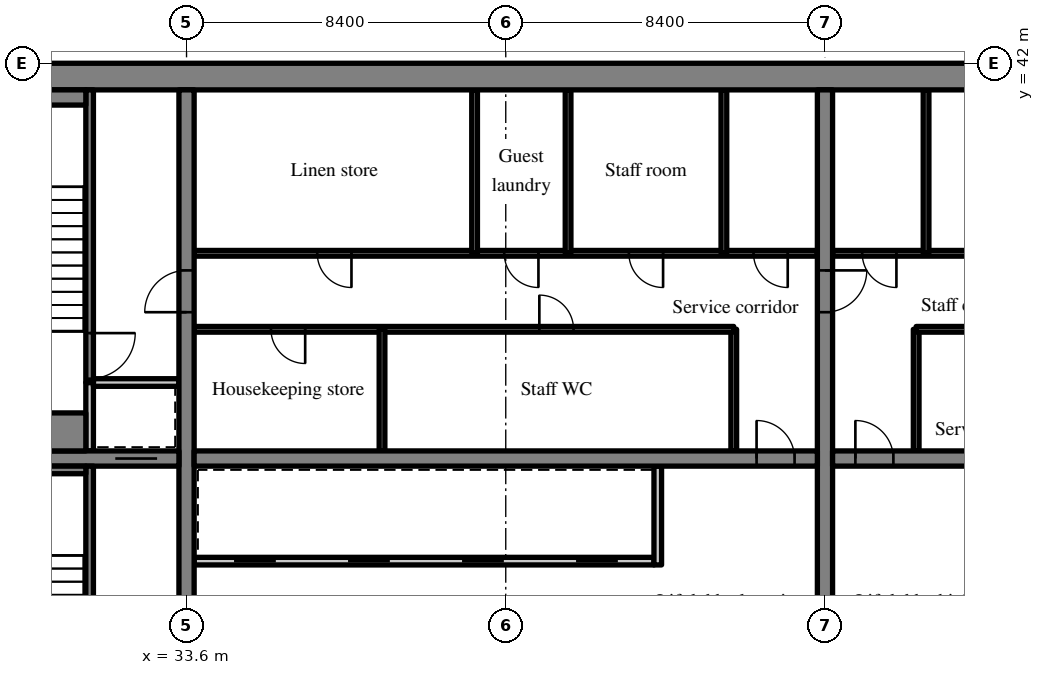
"""IFC4 building model, lengths in metres.
Left out: names, types, materials, properties, quantities, classifications, styles, units other than length and angle.
Written with IfcOpenShell. Run it as: python <this file> out.ifc"""

import sys

from ifc_helpers import new_model, si_unit, direction, frame, frame_2d, origin, place, context, subcontext, project, spatial, rectangle, extrude, source, transform, mapped, element, fill, save


model = new_model("IFC4")
c1 = context("Model", 3, precision=1e-05, world=origin(), true_north=direction((0.0, 1.0)))
c2 = subcontext(c1, "Body", "Model", "MODEL_VIEW")
j1 = project(units=[si_unit("LENGTHUNIT", "METRE"), si_unit("PLANEANGLEUNIT", "RADIAN")], contexts=[c1])
p1 = place(None, origin())
s1 = spatial("IfcSite", under=j1, at=p1, CompositionType="ELEMENT")
p2 = place(p1, origin())
s2 = spatial("IfcBuilding", under=s1, at=p2, CompositionType="ELEMENT")
p3 = place(p2, frame((0.0, 0.0, 146.2)))
s3 = spatial("IfcBuildingStorey", under=s2, at=p3, CompositionType="ELEMENT", Elevation=146.2)
m1 = source(origin(), c2, "Body", "SweptSolid", [
    extrude(rectangle(XDim=50.4, YDim=0.7, at=frame_2d((25.2, 0.0))), origin(), (0.0, 0.0, 1.0), 5.12),
])
p4 = place(p3, frame((25.2, 41.65, 0.0), z_axis=(0.0, 0.0, 1.0), x_axis=(1.0, 0.0, 0.0)))
e1 = element("IfcWall", 1, at=p4, inside=s3, PredefinedType="SHEAR", context=c2, shape_type="MappedRepresentation", body=[
    mapped(m1, transform((0.0, 0.0, 0.0), scale=1.0)),
])
m2 = source(origin(), c2, "Body", "SweptSolid", [
    extrude(rectangle(XDim=18.6, YDim=0.4, at=frame_2d((9.3, 0.0))), origin(), (0.0, 0.0, 1.0), 5.12),
])
p5 = place(p3, frame((33.6, 22.7, 0.0), z_axis=(0.0, 0.0, 1.0), x_axis=(0.0, 1.0, 0.0)))
e2 = element("IfcWall", 2, at=p5, inside=s3, PredefinedType="SHEAR", context=c2, shape_type="MappedRepresentation", body=[
    mapped(m2, transform((0.0, 0.0, 0.0), scale=1.0)),
])
m3 = source(origin(), c2, "Body", "SweptSolid", [
    extrude(rectangle(XDim=1.1, YDim=2.1, at=frame_2d((0.55, 1.05))), frame((0.0, 0.21, 0.0), z_axis=(0.0, -1.0, 0.0), x_axis=(1.0, 0.0, 0.0)), (0.0, 0.0, 1.0), 0.42),
])
p6 = place(p5, frame((12.75, 0.0, 0.0)))
e3 = element("IfcOpeningElement", 3, at=p6, cuts=e2, PredefinedType="OPENING", context=c2, shape_type="MappedRepresentation", body=[
    mapped(m3, transform((0.0, 0.0, 0.0), scale=1.0)),
])
p7 = place(p3, frame((50.4, 22.7, 0.0), z_axis=(0.0, 0.0, 1.0), x_axis=(0.0, 1.0, 0.0)))
e4 = element("IfcWall", 4, at=p7, inside=s3, PredefinedType="SHEAR", context=c2, shape_type="MappedRepresentation", body=[
    mapped(m2, transform((0.0, 0.0, 0.0), scale=1.0)),
])
p8 = place(p7, frame((12.75, 0.0, 0.0)))
e5 = element("IfcOpeningElement", 5, at=p8, cuts=e4, PredefinedType="OPENING", context=c2, shape_type="MappedRepresentation", body=[
    mapped(m3, transform((0.0, 0.0, 0.0), scale=1.0)),
])
m4 = source(origin(), c2, "Body", "SweptSolid", [
    extrude(rectangle(XDim=7.5, YDim=0.4, at=frame_2d((3.75, 0.0))), origin(), (0.0, 0.0, 1.0), 5.12),
])
p9 = place(p3, frame((25.9, 31.6, 0.0), z_axis=(0.0, 0.0, 1.0), x_axis=(1.0, 0.0, 0.0)))
e6 = element("IfcWall", 6, at=p9, inside=s3, PredefinedType="SHEAR", context=c2, shape_type="MappedRepresentation", body=[
    mapped(m4, transform((0.0, 0.0, 0.0), scale=1.0)),
])
p10 = place(p9, frame((5.825, 0.0, 0.0)))
e7 = element("IfcOpeningElement", 7, at=p10, cuts=e6, PredefinedType="OPENING", context=c2, shape_type="MappedRepresentation", body=[
    mapped(m3, transform((0.0, 0.0, 0.0), scale=1.0)),
])
m5 = source(origin(), c2, "Body", "SweptSolid", [
    extrude(rectangle(XDim=16.4, YDim=0.4, at=frame_2d((8.2, 0.0))), origin(), (0.0, 0.0, 1.0), 5.12),
])
p11 = place(p3, frame((33.8, 31.6, 0.0), z_axis=(0.0, 0.0, 1.0), x_axis=(1.0, 0.0, 0.0)))
e8 = element("IfcWall", 8, at=p11, inside=s3, PredefinedType="SHEAR", context=c2, shape_type="MappedRepresentation", body=[
    mapped(m5, transform((0.0, 0.0, 0.0), scale=1.0)),
])
m6 = source(origin(), c2, "Body", "SweptSolid", [
    extrude(rectangle(XDim=1.0, YDim=2.1, at=frame_2d((0.5, 1.05))), frame((0.0, 0.21, 0.0), z_axis=(0.0, -1.0, 0.0), x_axis=(1.0, 0.0, 0.0)), (0.0, 0.0, 1.0), 0.42),
])
p12 = place(p11, frame((14.8, 0.0, 0.0)))
e9 = element("IfcOpeningElement", 9, at=p12, cuts=e8, PredefinedType="OPENING", context=c2, shape_type="MappedRepresentation", body=[
    mapped(m6, transform((0.0, 0.0, 0.0), scale=1.0)),
])
p13 = place(p3, frame((50.6, 31.6, 0.0), z_axis=(0.0, 0.0, 1.0), x_axis=(1.0, 0.0, 0.0)))
e10 = element("IfcWall", 10, at=p13, inside=s3, PredefinedType="SHEAR", context=c2, shape_type="MappedRepresentation", body=[
    mapped(m5, transform((0.0, 0.0, 0.0), scale=1.0)),
])
p14 = place(p13, frame((0.6, 0.0, 0.0)))
e11 = element("IfcOpeningElement", 11, at=p14, cuts=e10, PredefinedType="OPENING", context=c2, shape_type="MappedRepresentation", body=[
    mapped(m6, transform((0.0, 0.0, 0.0), scale=1.0)),
])
m7 = source(origin(), c2, "Body", "SweptSolid", [
    extrude(rectangle(XDim=12.1, YDim=0.2, at=frame_2d((6.05, 0.0))), origin(), (0.0, 0.0, 1.0), 5.12),
])
p15 = place(p3, frame((33.8, 28.9, 0.0), z_axis=(0.0, 0.0, 1.0), x_axis=(1.0, 0.0, 0.0)))
e12 = element("IfcWall", 12, at=p15, inside=s3, PredefinedType="SOLIDWALL", context=c2, shape_type="MappedRepresentation", body=[
    mapped(m7, transform((0.0, 0.0, 0.0), scale=1.0)),
])
m8 = source(origin(), c2, "Body", "SweptSolid", [
    extrude(rectangle(XDim=1.1, YDim=2.1, at=frame_2d((0.55, 1.05))), frame((0.0, 0.11, 0.0), z_axis=(0.0, -1.0, 0.0), x_axis=(1.0, 0.0, 0.0)), (0.0, 0.0, 1.0), 0.22),
])
p16 = place(p15, frame((1.05, 0.0, 0.0)))
e13 = element("IfcOpeningElement", 13, at=p16, cuts=e12, PredefinedType="OPENING", context=c2, shape_type="MappedRepresentation", body=[
    mapped(m8, transform((0.0, 0.0, 0.0), scale=1.0)),
])
p17 = place(p15, frame((4.05, 0.0, 0.0)))
e14 = element("IfcOpeningElement", 14, at=p17, cuts=e12, PredefinedType="OPENING", context=c2, shape_type="MappedRepresentation", body=[
    mapped(m8, transform((0.0, 0.0, 0.0), scale=1.0)),
])
p18 = place(p15, frame((7.05, 0.0, 0.0)))
e15 = element("IfcOpeningElement", 15, at=p18, cuts=e12, PredefinedType="OPENING", context=c2, shape_type="MappedRepresentation", body=[
    mapped(m8, transform((0.0, 0.0, 0.0), scale=1.0)),
])
p19 = place(p15, frame((10.05, 0.0, 0.0)))
e16 = element("IfcOpeningElement", 16, at=p19, cuts=e12, PredefinedType="OPENING", context=c2, shape_type="MappedRepresentation", body=[
    mapped(m8, transform((0.0, 0.0, 0.0), scale=1.0)),
])
m9 = source(origin(), c2, "Body", "SweptSolid", [
    extrude(rectangle(XDim=2.6, YDim=0.2, at=frame_2d((1.3, 0.0))), origin(), (0.0, 0.0, 1.0), 5.12),
])
p20 = place(p3, frame((46.0, 28.8, 0.0), z_axis=(0.0, 0.0, 1.0), x_axis=(0.0, 1.0, 0.0)))
e17 = element("IfcWall", 17, at=p20, inside=s3, PredefinedType="SOLIDWALL", context=c2, shape_type="MappedRepresentation", body=[
    mapped(m9, transform((0.0, 0.0, 0.0), scale=1.0)),
])
m10 = source(origin(), c2, "Body", "SweptSolid", [
    extrude(rectangle(XDim=3.2, YDim=0.15, at=frame_2d((1.6, 0.0))), origin(), (0.0, 0.0, 1.0), 5.12),
])
p21 = place(p3, frame((48.0, 31.8, 0.0), z_axis=(0.0, 0.0, 1.0), x_axis=(0.0, 1.0, 0.0)))
e18 = element("IfcWall", 18, at=p21, inside=s3, PredefinedType="PARTITIONING", context=c2, shape_type="MappedRepresentation", body=[
    mapped(m10, transform((0.0, 0.0, 0.0), scale=1.0)),
])
m11 = source(origin(), c2, "Body", "SweptSolid", [
    extrude(rectangle(XDim=14.2, YDim=0.15, at=frame_2d((7.1, 0.0))), origin(), (0.0, 0.0, 1.0), 5.12),
])
p22 = place(p3, frame((33.8, 35.0, 0.0), z_axis=(0.0, 0.0, 1.0), x_axis=(1.0, 0.0, 0.0)))
e19 = element("IfcWall", 19, at=p22, inside=s3, PredefinedType="PARTITIONING", context=c2, shape_type="MappedRepresentation", body=[
    mapped(m11, transform((0.0, 0.0, 0.0), scale=1.0)),
])
m12 = source(origin(), c2, "Body", "SweptSolid", [
    extrude(rectangle(XDim=0.9, YDim=2.1, at=frame_2d((0.45, 1.05))), frame((0.0, 0.085, 0.0), z_axis=(0.0, -1.0, 0.0), x_axis=(1.0, 0.0, 0.0)), (0.0, 0.0, 1.0), 0.17),
])
p23 = place(p22, frame((2.022, 0.0, 0.0)))
e20 = element("IfcOpeningElement", 20, at=p23, cuts=e19, PredefinedType="OPENING", context=c2, shape_type="MappedRepresentation", body=[
    mapped(m12, transform((0.0, 0.0, 0.0), scale=1.0)),
])
p24 = place(p22, frame((9.084, 0.0, 0.0)))
e21 = element("IfcOpeningElement", 21, at=p24, cuts=e19, PredefinedType="OPENING", context=c2, shape_type="MappedRepresentation", body=[
    mapped(m12, transform((0.0, 0.0, 0.0), scale=1.0)),
])
m13 = source(origin(), c2, "Body", "SweptSolid", [
    extrude(rectangle(XDim=16.4, YDim=0.15, at=frame_2d((8.2, 0.0))), origin(), (0.0, 0.0, 1.0), 5.12),
])
p25 = place(p3, frame((33.8, 37.0, 0.0), z_axis=(0.0, 0.0, 1.0), x_axis=(1.0, 0.0, 0.0)))
e22 = element("IfcWall", 22, at=p25, inside=s3, PredefinedType="PARTITIONING", context=c2, shape_type="MappedRepresentation", body=[
    mapped(m13, transform((0.0, 0.0, 0.0), scale=1.0)),
])
p26 = place(p25, frame((3.24, 0.0, 0.0)))
e23 = element("IfcOpeningElement", 23, at=p26, cuts=e22, PredefinedType="OPENING", context=c2, shape_type="MappedRepresentation", body=[
    mapped(m12, transform((0.0, 0.0, 0.0), scale=1.0)),
])
p27 = place(p25, frame((8.16, 0.0, 0.0)))
e24 = element("IfcOpeningElement", 24, at=p27, cuts=e22, PredefinedType="OPENING", context=c2, shape_type="MappedRepresentation", body=[
    mapped(m12, transform((0.0, 0.0, 0.0), scale=1.0)),
])
p28 = place(p25, frame((11.44, 0.0, 0.0)))
e25 = element("IfcOpeningElement", 25, at=p28, cuts=e22, PredefinedType="OPENING", context=c2, shape_type="MappedRepresentation", body=[
    mapped(m12, transform((0.0, 0.0, 0.0), scale=1.0)),
])
p29 = place(p25, frame((14.72, 0.0, 0.0)))
e26 = element("IfcOpeningElement", 26, at=p29, cuts=e22, PredefinedType="OPENING", context=c2, shape_type="MappedRepresentation", body=[
    mapped(m12, transform((0.0, 0.0, 0.0), scale=1.0)),
])
p30 = place(p3, frame((38.744, 31.8, 0.0), z_axis=(0.0, 0.0, 1.0), x_axis=(0.0, 1.0, 0.0)))
e27 = element("IfcWall", 27, at=p30, inside=s3, PredefinedType="PARTITIONING", context=c2, shape_type="MappedRepresentation", body=[
    mapped(m10, transform((0.0, 0.0, 0.0), scale=1.0)),
])
m14 = source(origin(), c2, "Body", "SweptSolid", [
    extrude(rectangle(XDim=4.3, YDim=0.15, at=frame_2d((2.15, 0.0))), origin(), (0.0, 0.0, 1.0), 5.12),
])
for number, where, z_axis, x_axis in (
    (28, (41.18, 37.0, 0.0), (0.0, 0.0, 1.0), (0.0, 1.0, 0.0)),
    (29, (43.64, 37.0, 0.0), (0.0, 0.0, 1.0), (0.0, 1.0, 0.0)),
    (30, (47.74, 37.0, 0.0), (0.0, 0.0, 1.0), (0.0, 1.0, 0.0)),
):
    element("IfcWall", number, at=place(p3, frame(where, z_axis=z_axis, x_axis=x_axis)), inside=s3, PredefinedType="PARTITIONING", context=c2, shape_type="MappedRepresentation", body=[
        mapped(m14, transform((0.0, 0.0, 0.0), scale=1.0)),
    ])
p31 = place(p3, frame((52.8, 31.8, 0.0), z_axis=(0.0, 0.0, 1.0), x_axis=(0.0, 1.0, 0.0)))
e31 = element("IfcWall", 31, at=p31, inside=s3, PredefinedType="PARTITIONING", context=c2, shape_type="MappedRepresentation", body=[
    mapped(m10, transform((0.0, 0.0, 0.0), scale=1.0)),
])
p32 = place(p3, frame((67.0, 35.0, 0.0), z_axis=(0.0, 0.0, 1.0), x_axis=(-1.0, 0.0, 0.0)))
e32 = element("IfcWall", 32, at=p32, inside=s3, PredefinedType="PARTITIONING", context=c2, shape_type="MappedRepresentation", body=[
    mapped(m11, transform((0.0, 0.0, 0.0), scale=1.0)),
])
p33 = place(p32, frame((0.962, 0.0, 0.0)))
e33 = element("IfcOpeningElement", 33, at=p33, cuts=e32, PredefinedType="OPENING", context=c2, shape_type="MappedRepresentation", body=[
    mapped(m12, transform((0.0, 0.0, 0.0), scale=1.0)),
])
p34 = place(p32, frame((5.906, 0.0, 0.0)))
e34 = element("IfcOpeningElement", 34, at=p34, cuts=e32, PredefinedType="OPENING", context=c2, shape_type="MappedRepresentation", body=[
    mapped(m12, transform((0.0, 0.0, 0.0), scale=1.0)),
])
p35 = place(p32, frame((11.556, 0.0, 0.0)))
e35 = element("IfcOpeningElement", 35, at=p35, cuts=e32, PredefinedType="OPENING", context=c2, shape_type="MappedRepresentation", body=[
    mapped(m12, transform((0.0, 0.0, 0.0), scale=1.0)),
])
p36 = place(p3, frame((67.0, 37.0, 0.0), z_axis=(0.0, 0.0, 1.0), x_axis=(-1.0, 0.0, 0.0)))
e36 = element("IfcWall", 36, at=p36, inside=s3, PredefinedType="PARTITIONING", context=c2, shape_type="MappedRepresentation", body=[
    mapped(m13, transform((0.0, 0.0, 0.0), scale=1.0)),
])
p37 = place(p36, frame((0.78, 0.0, 0.0)))
e37 = element("IfcOpeningElement", 37, at=p37, cuts=e36, PredefinedType="OPENING", context=c2, shape_type="MappedRepresentation", body=[
    mapped(m12, transform((0.0, 0.0, 0.0), scale=1.0)),
])
p38 = place(p36, frame((3.65, 0.0, 0.0)))
e38 = element("IfcOpeningElement", 38, at=p38, cuts=e36, PredefinedType="OPENING", context=c2, shape_type="MappedRepresentation", body=[
    mapped(m12, transform((0.0, 0.0, 0.0), scale=1.0)),
])
p39 = place(p36, frame((9.39, 0.0, 0.0)))
e39 = element("IfcOpeningElement", 39, at=p39, cuts=e36, PredefinedType="OPENING", context=c2, shape_type="MappedRepresentation", body=[
    mapped(m12, transform((0.0, 0.0, 0.0), scale=1.0)),
])
p40 = place(p36, frame((14.72, 0.0, 0.0)))
e40 = element("IfcOpeningElement", 40, at=p40, cuts=e36, PredefinedType="OPENING", context=c2, shape_type="MappedRepresentation", body=[
    mapped(m12, transform((0.0, 0.0, 0.0), scale=1.0)),
])
p41 = place(p3, frame((53.06, 37.0, 0.0), z_axis=(0.0, 0.0, 1.0), x_axis=(0.0, 1.0, 0.0)))
e41 = element("IfcWall", 41, at=p41, inside=s3, PredefinedType="PARTITIONING", context=c2, shape_type="MappedRepresentation", body=[
    mapped(m14, transform((0.0, 0.0, 0.0), scale=1.0)),
])
m15 = source(origin(), c2, "Body", "SweptSolid", [
    extrude(rectangle(XDim=8.7, YDim=0.2, at=frame_2d((4.35, 0.0))), origin(), (0.0, 0.0, 1.0), 5.12),
])
p42 = place(p3, frame((31.05, 22.7, 0.0), z_axis=(0.0, 0.0, 1.0), x_axis=(0.0, 1.0, 0.0)))
e42 = element("IfcWall", 42, at=p42, inside=s3, PredefinedType="SOLIDWALL", context=c2, shape_type="MappedRepresentation", body=[
    mapped(m15, transform((0.0, 0.0, 0.0), scale=1.0)),
])
m16 = source(origin(), c2, "Body", "SweptSolid", [
    extrude(rectangle(XDim=1.2, YDim=2.1, at=frame_2d((0.6, 1.05))), frame((0.0, 0.11, 0.0), z_axis=(0.0, -1.0, 0.0), x_axis=(1.0, 0.0, 0.0)), (0.0, 0.0, 1.0), 0.22),
])
p43 = place(p42, frame((0.9, 0.0, 0.0)))
e43 = element("IfcOpeningElement", 43, at=p43, cuts=e42, PredefinedType="OPENING", context=c2, shape_type="MappedRepresentation", body=[
    mapped(m16, transform((0.0, 0.0, 0.0), scale=1.0)),
])
m17 = source(origin(), c2, "Body", "SweptSolid", [
    extrude(rectangle(XDim=1.8, YDim=0.2, at=frame_2d((0.9, 0.0))), origin(), (0.0, 0.0, 1.0), 5.12),
])
p44 = place(p3, frame((31.05, 31.8, 0.0), z_axis=(0.0, 0.0, 1.0), x_axis=(0.0, 1.0, 0.0)))
e44 = element("IfcWall", 44, at=p44, inside=s3, PredefinedType="SOLIDWALL", context=c2, shape_type="MappedRepresentation", body=[
    mapped(m17, transform((0.0, 0.0, 0.0), scale=1.0)),
])
m18 = source(origin(), c2, "Body", "SweptSolid", [
    extrude(rectangle(XDim=2.25, YDim=0.2, at=frame_2d((1.125, 0.0))), origin(), (0.0, 0.0, 1.0), 5.12),
])
p45 = place(p3, frame((31.15, 33.6, 0.0), z_axis=(0.0, 0.0, 1.0), x_axis=(1.0, 0.0, 0.0)))
e45 = element("IfcWall", 45, at=p45, inside=s3, PredefinedType="SOLIDWALL", context=c2, shape_type="MappedRepresentation", body=[
    mapped(m18, transform((0.0, 0.0, 0.0), scale=1.0)),
])
m19 = source(origin(), c2, "Body", "SweptSolid", [
    extrude(rectangle(XDim=7.7, YDim=0.2, at=frame_2d((3.85, 0.0))), origin(), (0.0, 0.0, 1.0), 5.12),
])
p46 = place(p3, frame((31.05, 33.6, 0.0), z_axis=(0.0, 0.0, 1.0), x_axis=(0.0, 1.0, 0.0)))
e46 = element("IfcWall", 46, at=p46, inside=s3, PredefinedType="SOLIDWALL", context=c2, shape_type="MappedRepresentation", body=[
    mapped(m19, transform((0.0, 0.0, 0.0), scale=1.0)),
])
p47 = place(p46, frame((0.1, 0.0, 0.0)))
e47 = element("IfcOpeningElement", 47, at=p47, cuts=e46, PredefinedType="OPENING", context=c2, shape_type="MappedRepresentation", body=[
    mapped(m16, transform((0.0, 0.0, 0.0), scale=1.0)),
])
m20 = source(origin(), c2, "Body", "SweptSolid", [
    extrude(rectangle(XDim=5.05, YDim=0.2, at=frame_2d((2.525, 0.0))), origin(), (0.0, 0.0, 1.0), 5.12),
])
p48 = place(p3, frame((25.9, 31.3, 0.0), z_axis=(0.0, 0.0, 1.0), x_axis=(1.0, 0.0, 0.0)))
e48 = element("IfcWall", 48, at=p48, inside=s3, PredefinedType="SOLIDWALL", context=c2, shape_type="MappedRepresentation", body=[
    mapped(m20, transform((0.0, 0.0, 0.0), scale=1.0)),
])
m21 = source(origin(), c2, "Body", "SweptSolid", [
    extrude(rectangle(XDim=5.05, YDim=0.4, at=frame_2d((2.525, 0.0))), origin(), (0.0, 0.0, 1.0), 5.12),
])
p49 = place(p3, frame((25.9, 41.1, 0.0), z_axis=(0.0, 0.0, 1.0), x_axis=(1.0, 0.0, 0.0)))
e49 = element("IfcWall", 49, at=p49, inside=s3, PredefinedType="SOLIDWALL", context=c2, shape_type="MappedRepresentation", body=[
    mapped(m21, transform((0.0, 0.0, 0.0), scale=1.0)),
])
m22 = source(origin(), c2, "Body", "SweptSolid", [
    extrude(rectangle(XDim=5.05, YDim=1.0, at=frame_2d((2.525, 0.0))), origin(), (0.0, 0.0, 1.0), 5.12),
])
p50 = place(p3, frame((25.9, 32.3, 0.0), z_axis=(0.0, 0.0, 1.0), x_axis=(1.0, 0.0, 0.0)))
e50 = element("IfcWall", 50, at=p50, inside=s3, PredefinedType="SOLIDWALL", context=c2, shape_type="MappedRepresentation", body=[
    mapped(m22, transform((0.0, 0.0, 0.0), scale=1.0)),
])
m23 = source(origin(), c2, "Body", "SweptSolid", [
    extrude(rectangle(XDim=1.0, YDim=2.1, at=frame_2d((0.5, 1.05))), frame((0.0, 0.025, 0.0), z_axis=(0.0, -1.0, 0.0), x_axis=(1.0, 0.0, 0.0)), (0.0, 0.0, 1.0), 0.05),
])
p51 = place(p12, origin())
e51 = element("IfcDoor", 51, at=p51, inside=s3, OperationType="SINGLE_SWING_LEFT", PredefinedType="DOOR", context=c2, shape_type="MappedRepresentation", body=[
    mapped(m23, transform((0.0, 0.0, 0.0), scale=1.0)),
])
fill(e9, e51)
m24 = source(origin(), c2, "Body", "SweptSolid", [
    extrude(rectangle(XDim=1.1, YDim=2.1, at=frame_2d((0.55, 1.05))), frame((0.0, 0.025, 0.0), z_axis=(0.0, -1.0, 0.0), x_axis=(1.0, 0.0, 0.0)), (0.0, 0.0, 1.0), 0.05),
])
p52 = place(p16, origin())
e52 = element("IfcDoor", 52, at=p52, inside=s3, OperationType="SLIDING_TO_LEFT", PredefinedType="DOOR", context=c2, shape_type="MappedRepresentation", body=[
    mapped(m24, transform((0.0, 0.0, 0.0), scale=1.0)),
])
fill(e13, e52)
p53 = place(p17, origin())
e53 = element("IfcDoor", 53, at=p53, inside=s3, OperationType="SLIDING_TO_RIGHT", PredefinedType="DOOR", context=c2, shape_type="MappedRepresentation", body=[
    mapped(m24, transform((0.0, 0.0, 0.0), scale=1.0)),
])
fill(e14, e53)
p54 = place(p18, origin())
e54 = element("IfcDoor", 54, at=p54, inside=s3, OperationType="SLIDING_TO_LEFT", PredefinedType="DOOR", context=c2, shape_type="MappedRepresentation", body=[
    mapped(m24, transform((0.0, 0.0, 0.0), scale=1.0)),
])
fill(e15, e54)
p55 = place(p19, origin())
e55 = element("IfcDoor", 55, at=p55, inside=s3, OperationType="SLIDING_TO_RIGHT", PredefinedType="DOOR", context=c2, shape_type="MappedRepresentation", body=[
    mapped(m24, transform((0.0, 0.0, 0.0), scale=1.0)),
])
fill(e16, e55)
m25 = source(origin(), c2, "Body", "SweptSolid", [
    extrude(rectangle(XDim=0.9, YDim=2.1, at=frame_2d((0.45, 1.05))), frame((0.0, 0.025, 0.0), z_axis=(0.0, -1.0, 0.0), x_axis=(1.0, 0.0, 0.0)), (0.0, 0.0, 1.0), 0.05),
])
p56 = place(p23, origin())
e56 = element("IfcDoor", 56, at=p56, inside=s3, OperationType="SINGLE_SWING_RIGHT", PredefinedType="DOOR", context=c2, shape_type="MappedRepresentation", body=[
    mapped(m25, transform((0.0, 0.0, 0.0), scale=1.0)),
])
fill(e20, e56)
p57 = place(p24, origin())
e57 = element("IfcDoor", 57, at=p57, inside=s3, OperationType="SINGLE_SWING_LEFT", PredefinedType="DOOR", context=c2, shape_type="MappedRepresentation", body=[
    mapped(m25, transform((0.0, 0.0, 0.0), scale=1.0)),
])
fill(e21, e57)
p58 = place(p26, origin())
e58 = element("IfcDoor", 58, at=p58, inside=s3, OperationType="SINGLE_SWING_RIGHT", PredefinedType="DOOR", context=c2, shape_type="MappedRepresentation", body=[
    mapped(m25, transform((0.0, 0.0, 0.0), scale=1.0)),
])
fill(e23, e58)
p59 = place(p27, origin())
e59 = element("IfcDoor", 59, at=p59, inside=s3, OperationType="SINGLE_SWING_RIGHT", PredefinedType="DOOR", context=c2, shape_type="MappedRepresentation", body=[
    mapped(m25, transform((0.0, 0.0, 0.0), scale=1.0)),
])
fill(e24, e59)
p60 = place(p28, origin())
e60 = element("IfcDoor", 60, at=p60, inside=s3, OperationType="SINGLE_SWING_RIGHT", PredefinedType="DOOR", context=c2, shape_type="MappedRepresentation", body=[
    mapped(m25, transform((0.0, 0.0, 0.0), scale=1.0)),
])
fill(e25, e60)
p61 = place(p29, origin())
e61 = element("IfcDoor", 61, at=p61, inside=s3, OperationType="SINGLE_SWING_RIGHT", PredefinedType="DOOR", context=c2, shape_type="MappedRepresentation", body=[
    mapped(m25, transform((0.0, 0.0, 0.0), scale=1.0)),
])
fill(e26, e61)
p62 = place(p14, origin())
e62 = element("IfcDoor", 62, at=p62, inside=s3, OperationType="SINGLE_SWING_LEFT", PredefinedType="DOOR", context=c2, shape_type="MappedRepresentation", body=[
    mapped(m23, transform((0.0, 0.0, 0.0), scale=1.0)),
])
fill(e11, e62)
p63 = place(p40, origin())
e63 = element("IfcDoor", 63, at=p63, inside=s3, OperationType="SINGLE_SWING_LEFT", PredefinedType="DOOR", context=c2, shape_type="MappedRepresentation", body=[
    mapped(m25, transform((0.0, 0.0, 0.0), scale=1.0)),
])
fill(e40, e63)
p64 = place(p10, origin())
e64 = element("IfcDoor", 64, at=p64, inside=s3, OperationType="SLIDING_TO_RIGHT", PredefinedType="DOOR", context=c2, shape_type="MappedRepresentation", body=[
    mapped(m24, transform((0.0, 0.0, 0.0), scale=1.0)),
])
fill(e7, e64)
m26 = source(origin(), c2, "Body", "SweptSolid", [
    extrude(rectangle(XDim=1.2, YDim=2.1, at=frame_2d((0.6, 1.05))), frame((0.0, 0.025, 0.0), z_axis=(0.0, -1.0, 0.0), x_axis=(1.0, 0.0, 0.0)), (0.0, 0.0, 1.0), 0.05),
])
p65 = place(p47, origin())
e65 = element("IfcDoor", 65, at=p65, inside=s3, OperationType="SINGLE_SWING_RIGHT", PredefinedType="DOOR", context=c2, shape_type="MappedRepresentation", body=[
    mapped(m26, transform((0.0, 0.0, 0.0), scale=1.0)),
])
fill(e47, e65)
p66 = place(p6, origin())
e66 = element("IfcDoor", 66, at=p66, inside=s3, OperationType="SINGLE_SWING_LEFT", PredefinedType="DOOR", context=c2, shape_type="MappedRepresentation", body=[
    mapped(m24, transform((0.0, 0.0, 0.0), scale=1.0)),
])
fill(e3, e66)
p67 = place(p8, origin())
e67 = element("IfcDoor", 67, at=p67, inside=s3, OperationType="SINGLE_SWING_RIGHT", PredefinedType="DOOR", context=c2, shape_type="MappedRepresentation", body=[
    mapped(m24, transform((0.0, 0.0, 0.0), scale=1.0)),
])
fill(e5, e67)
save(model, sys.argv[1])
